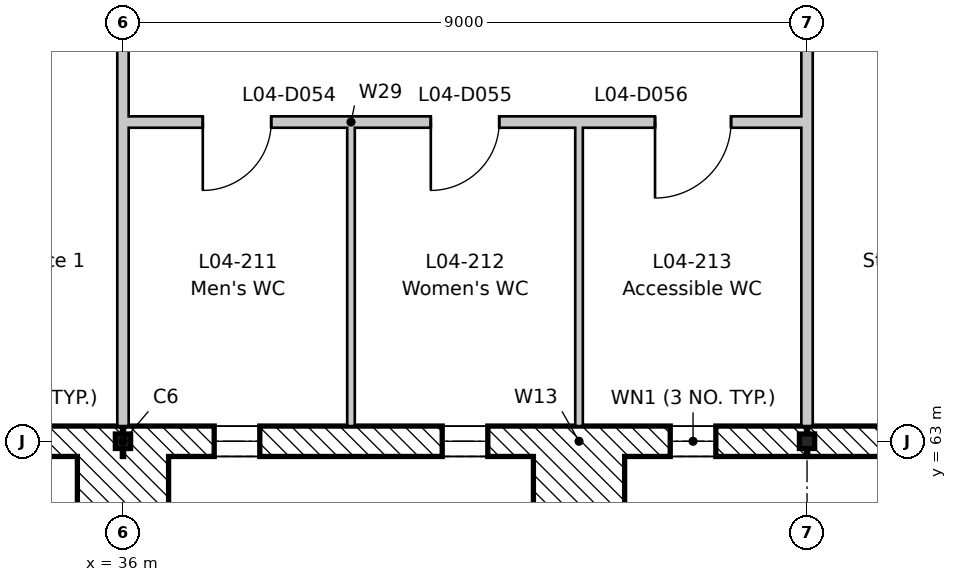
"""IFC4 building model, lengths in metres.
Left out: names, types, materials, properties, quantities, classifications, styles, units other than length and angle.
Written with IfcOpenShell. Run it as: python <this file> out.ifc"""

import sys

from ifc_helpers import new_model, si_unit, direction, frame, frame_2d, origin, origin_2d, place, context, subcontext, project, spatial, rectangle, i_section, extrude, element, fill, save


model = new_model("IFC4")
c1 = context("Model", 3, precision=1e-05, world=origin(), true_north=direction((0.0, 1.0)))
c2 = subcontext(c1, "Body", "Model", "MODEL_VIEW")
j1 = project(units=[si_unit("LENGTHUNIT", "METRE"), si_unit("PLANEANGLEUNIT", "RADIAN")], contexts=[c1])
p1 = place(None, origin())
s1 = spatial("IfcSite", under=j1, at=p1, CompositionType="ELEMENT")
p2 = place(p1, origin())
s2 = spatial("IfcBuilding", under=s1, at=p2, CompositionType="ELEMENT")
p3 = place(p2, frame((0.0, 0.0, 18.6)))
s3 = spatial("IfcBuildingStorey", under=s2, at=p3, CompositionType="ELEMENT", Elevation=18.6)
for number, where, z_axis, x_axis in (
    (1, (36.0, 63.0, -0.2), (0.0, 0.0, 1.0), (1.0, 0.0, 0.0)),
    (2, (45.0, 63.0, -0.2), (0.0, 0.0, 1.0), (1.0, 0.0, 0.0)),
):
    element("IfcColumn", number, at=place(p3, frame(where, z_axis=z_axis, x_axis=x_axis)), inside=s3, PredefinedType="COLUMN", context=c2, shape_type="SweptSolid", body=[
        extrude(i_section(OverallWidth=0.2, OverallDepth=0.19, WebThickness=0.007, FlangeThickness=0.01, FilletRadius=0.018, at=origin_2d()), origin(), (0.0, 0.0, 1.0), 4.15),
    ])
p4 = place(p3, frame((35.992, 63.0, 0.0), z_axis=(0.0, 0.0, 1.0), x_axis=(-1.0, 0.0, 0.0)))
e3 = element("IfcWall", 3, at=p4, inside=s3, PredefinedType="STANDARD", context=c2, shape_type="SweptSolid", body=[
    extrude(rectangle(XDim=8.983, YDim=0.4, at=frame_2d((4.492, 0.0))), origin(), (0.0, 0.0, 1.0), 3.55),
])
p5 = place(p4, frame((7.117, 0.0, 1.5)))
e4 = element("IfcOpeningElement", 4, at=p5, cuts=e3, PredefinedType="OPENING", context=c2, shape_type="SweptSolid", body=[
    extrude(rectangle(XDim=0.75, YDim=1.2, at=frame_2d((0.375, 0.6))), frame((0.0, 0.21, 0.0), z_axis=(0.0, -1.0, 0.0), x_axis=(1.0, 0.0, 0.0)), (0.0, 0.0, 1.0), 0.42),
])
p6 = place(p4, frame((4.117, 0.0, 1.5)))
e5 = element("IfcOpeningElement", 5, at=p6, cuts=e3, PredefinedType="OPENING", context=c2, shape_type="SweptSolid", body=[
    extrude(rectangle(XDim=0.75, YDim=1.2, at=frame_2d((0.375, 0.6))), frame((0.0, 0.21, 0.0), z_axis=(0.0, -1.0, 0.0), x_axis=(1.0, 0.0, 0.0)), (0.0, 0.0, 1.0), 0.42),
])
p7 = place(p4, frame((1.117, 0.0, 1.5)))
e6 = element("IfcOpeningElement", 6, at=p7, cuts=e3, PredefinedType="OPENING", context=c2, shape_type="SweptSolid", body=[
    extrude(rectangle(XDim=0.75, YDim=1.2, at=frame_2d((0.375, 0.6))), frame((0.0, 0.21, 0.0), z_axis=(0.0, -1.0, 0.0), x_axis=(1.0, 0.0, 0.0)), (0.0, 0.0, 1.0), 0.42),
])
p8 = place(p3, frame((44.992, 63.0, 0.0), z_axis=(0.0, 0.0, 1.0), x_axis=(-1.0, 0.0, 0.0)))
e7 = element("IfcWall", 7, at=p8, inside=s3, PredefinedType="STANDARD", context=c2, shape_type="SweptSolid", body=[
    extrude(rectangle(XDim=8.983, YDim=0.4, at=frame_2d((4.492, 0.0))), origin(), (0.0, 0.0, 1.0), 3.55),
])
p9 = place(p8, frame((7.192, 0.0, 1.5)))
e8 = element("IfcOpeningElement", 8, at=p9, cuts=e7, PredefinedType="OPENING", context=c2, shape_type="SweptSolid", body=[
    extrude(rectangle(XDim=0.6, YDim=1.2, at=frame_2d((0.3, 0.6))), frame((0.0, 0.21, 0.0), z_axis=(0.0, -1.0, 0.0), x_axis=(1.0, 0.0, 0.0)), (0.0, 0.0, 1.0), 0.42),
])
p10 = place(p8, frame((4.192, 0.0, 1.5)))
e9 = element("IfcOpeningElement", 9, at=p10, cuts=e7, PredefinedType="OPENING", context=c2, shape_type="SweptSolid", body=[
    extrude(rectangle(XDim=0.6, YDim=1.2, at=frame_2d((0.3, 0.6))), frame((0.0, 0.21, 0.0), z_axis=(0.0, -1.0, 0.0), x_axis=(1.0, 0.0, 0.0)), (0.0, 0.0, 1.0), 0.42),
])
p11 = place(p8, frame((1.192, 0.0, 1.5)))
e10 = element("IfcOpeningElement", 10, at=p11, cuts=e7, PredefinedType="OPENING", context=c2, shape_type="SweptSolid", body=[
    extrude(rectangle(XDim=0.6, YDim=1.2, at=frame_2d((0.3, 0.6))), frame((0.0, 0.21, 0.0), z_axis=(0.0, -1.0, 0.0), x_axis=(1.0, 0.0, 0.0)), (0.0, 0.0, 1.0), 0.42),
])
p12 = place(p3, frame((53.992, 63.0, 0.0), z_axis=(0.0, 0.0, 1.0), x_axis=(-1.0, 0.0, 0.0)))
e11 = element("IfcWall", 11, at=p12, inside=s3, PredefinedType="STANDARD", context=c2, shape_type="SweptSolid", body=[
    extrude(rectangle(XDim=8.983, YDim=0.4, at=frame_2d((4.492, 0.0))), origin(), (0.0, 0.0, 1.0), 3.55),
])
p13 = place(p12, frame((7.117, 0.0, 1.5)))
e12 = element("IfcOpeningElement", 12, at=p13, cuts=e11, PredefinedType="OPENING", context=c2, shape_type="SweptSolid", body=[
    extrude(rectangle(XDim=0.75, YDim=1.2, at=frame_2d((0.375, 0.6))), frame((0.0, 0.21, 0.0), z_axis=(0.0, -1.0, 0.0), x_axis=(1.0, 0.0, 0.0)), (0.0, 0.0, 1.0), 0.42),
])
p14 = place(p12, frame((3.892, 0.0, 0.9)))
e13 = element("IfcOpeningElement", 13, at=p14, cuts=e11, PredefinedType="OPENING", context=c2, shape_type="SweptSolid", body=[
    extrude(rectangle(XDim=1.2, YDim=2.4, at=frame_2d((0.6, 1.2))), frame((0.0, 0.21, 0.0), z_axis=(0.0, -1.0, 0.0), x_axis=(1.0, 0.0, 0.0)), (0.0, 0.0, 1.0), 0.42),
])
for number, where, z_axis, x_axis in (
    (14, (35.4, 62.2, 0.0), (0.0, 0.0, 1.0), (1.0, 0.0, 0.0)),
    (15, (41.4, 62.2, 0.0), (0.0, 0.0, 1.0), (1.0, 0.0, 0.0)),
):
    element("IfcWall", number, at=place(p3, frame(where, z_axis=z_axis, x_axis=x_axis)), inside=s3, PredefinedType="STANDARD", context=c2, shape_type="SweptSolid", body=[
        extrude(rectangle(XDim=1.2, YDim=1.2, at=frame_2d((0.6, 0.0))), origin(), (0.0, 0.0, 1.0), 3.35),
    ])
for number, where, z_axis, x_axis in (
    (16, (36.0, 63.2, 0.0), (0.0, 0.0, 1.0), (0.0, 1.0, 0.0)),
    (17, (45.0, 63.2, 0.0), (0.0, 0.0, 1.0), (0.0, 1.0, 0.0)),
):
    element("IfcWall", number, at=place(p3, frame(where, z_axis=z_axis, x_axis=x_axis)), inside=s3, PredefinedType="PARTITIONING", context=c2, shape_type="SweptSolid", body=[
        extrude(rectangle(XDim=7.225, YDim=0.15, at=frame_2d((3.613, 0.0))), origin(), (0.0, 0.0, 1.0), 3.6),
    ])
p15 = place(p3, frame((36.075, 67.2, 0.0), z_axis=(0.0, 0.0, 1.0), x_axis=(1.0, 0.0, 0.0)))
e18 = element("IfcWall", 18, at=p15, inside=s3, PredefinedType="PARTITIONING", context=c2, shape_type="SweptSolid", body=[
    extrude(rectangle(XDim=8.85, YDim=0.15, at=frame_2d((4.425, 0.0))), origin(), (0.0, 0.0, 1.0), 3.95),
])
p16 = place(p15, frame((0.975, 0.0, 0.0)))
e19 = element("IfcOpeningElement", 19, at=p16, cuts=e18, PredefinedType="OPENING", context=c2, shape_type="SweptSolid", body=[
    extrude(rectangle(XDim=0.9, YDim=2.1, at=frame_2d((0.45, 1.05))), frame((0.0, 0.085, 0.0), z_axis=(0.0, -1.0, 0.0), x_axis=(1.0, 0.0, 0.0)), (0.0, 0.0, 1.0), 0.17),
])
p17 = place(p15, frame((3.975, 0.0, 0.0)))
e20 = element("IfcOpeningElement", 20, at=p17, cuts=e18, PredefinedType="OPENING", context=c2, shape_type="SweptSolid", body=[
    extrude(rectangle(XDim=0.9, YDim=2.1, at=frame_2d((0.45, 1.05))), frame((0.0, 0.085, 0.0), z_axis=(0.0, -1.0, 0.0), x_axis=(1.0, 0.0, 0.0)), (0.0, 0.0, 1.0), 0.17),
])
p18 = place(p15, frame((6.925, 0.0, 0.0)))
e21 = element("IfcOpeningElement", 21, at=p18, cuts=e18, PredefinedType="OPENING", context=c2, shape_type="SweptSolid", body=[
    extrude(rectangle(XDim=1.0, YDim=2.1, at=frame_2d((0.5, 1.05))), frame((0.0, 0.085, 0.0), z_axis=(0.0, -1.0, 0.0), x_axis=(1.0, 0.0, 0.0)), (0.0, 0.0, 1.0), 0.17),
])
for number, where, z_axis, x_axis in (
    (22, (39.0, 63.2, 0.0), (0.0, 0.0, 1.0), (0.0, 1.0, 0.0)),
    (23, (42.0, 63.2, 0.0), (0.0, 0.0, 1.0), (0.0, 1.0, 0.0)),
):
    element("IfcWall", number, at=place(p3, frame(where, z_axis=z_axis, x_axis=x_axis)), inside=s3, PredefinedType="PARTITIONING", context=c2, shape_type="SweptSolid", body=[
        extrude(rectangle(XDim=3.925, YDim=0.1, at=frame_2d((1.962, 0.0))), origin(), (0.0, 0.0, 1.0), 3.95),
    ])
p19 = place(p9, origin())
e24 = element("IfcWindow", 24, at=p19, inside=s3, PartitioningType="SINGLE_PANEL", PredefinedType="WINDOW", context=c2, shape_type="SweptSolid", body=[
    extrude(rectangle(XDim=0.6, YDim=1.2, at=frame_2d((0.3, 0.6))), frame((0.0, -0.12, 0.0), z_axis=(0.0, -1.0, 0.0), x_axis=(1.0, 0.0, 0.0)), (0.0, 0.0, 1.0), 0.06),
])
fill(e8, e24)
p20 = place(p10, origin())
e25 = element("IfcWindow", 25, at=p20, inside=s3, PartitioningType="SINGLE_PANEL", PredefinedType="WINDOW", context=c2, shape_type="SweptSolid", body=[
    extrude(rectangle(XDim=0.6, YDim=1.2, at=frame_2d((0.3, 0.6))), frame((0.0, -0.12, 0.0), z_axis=(0.0, -1.0, 0.0), x_axis=(1.0, 0.0, 0.0)), (0.0, 0.0, 1.0), 0.06),
])
fill(e9, e25)
p21 = place(p11, origin())
e26 = element("IfcWindow", 26, at=p21, inside=s3, PartitioningType="SINGLE_PANEL", PredefinedType="WINDOW", context=c2, shape_type="SweptSolid", body=[
    extrude(rectangle(XDim=0.6, YDim=1.2, at=frame_2d((0.3, 0.6))), frame((0.0, -0.12, 0.0), z_axis=(0.0, -1.0, 0.0), x_axis=(1.0, 0.0, 0.0)), (0.0, 0.0, 1.0), 0.06),
])
fill(e10, e26)
p22 = place(p16, frame((0.9, 0.0, 0.0), z_axis=(0.0, 0.0, 1.0), x_axis=(-1.0, 0.0, 0.0)))
e27 = element("IfcDoor", 27, at=p22, inside=s3, OperationType="SINGLE_SWING_RIGHT", PredefinedType="DOOR", context=c2, shape_type="SweptSolid", body=[
    extrude(rectangle(XDim=0.9, YDim=2.1, at=frame_2d((0.45, 1.05))), frame((0.0, 0.025, 0.0), z_axis=(0.0, -1.0, 0.0), x_axis=(1.0, 0.0, 0.0)), (0.0, 0.0, 1.0), 0.05),
])
fill(e19, e27)
p23 = place(p17, frame((0.9, 0.0, 0.0), z_axis=(0.0, 0.0, 1.0), x_axis=(-1.0, 0.0, 0.0)))
e28 = element("IfcDoor", 28, at=p23, inside=s3, OperationType="SINGLE_SWING_RIGHT", PredefinedType="DOOR", context=c2, shape_type="SweptSolid", body=[
    extrude(rectangle(XDim=0.9, YDim=2.1, at=frame_2d((0.45, 1.05))), frame((0.0, 0.025, 0.0), z_axis=(0.0, -1.0, 0.0), x_axis=(1.0, 0.0, 0.0)), (0.0, 0.0, 1.0), 0.05),
])
fill(e20, e28)
p24 = place(p18, frame((1.0, 0.0, 0.0), z_axis=(0.0, 0.0, 1.0), x_axis=(-1.0, 0.0, 0.0)))
e29 = element("IfcDoor", 29, at=p24, inside=s3, OperationType="SINGLE_SWING_RIGHT", PredefinedType="DOOR", context=c2, shape_type="SweptSolid", body=[
    extrude(rectangle(XDim=1.0, YDim=2.1, at=frame_2d((0.5, 1.05))), frame((0.0, 0.025, 0.0), z_axis=(0.0, -1.0, 0.0), x_axis=(1.0, 0.0, 0.0)), (0.0, 0.0, 1.0), 0.05),
])
fill(e21, e29)
save(model, sys.argv[1])
